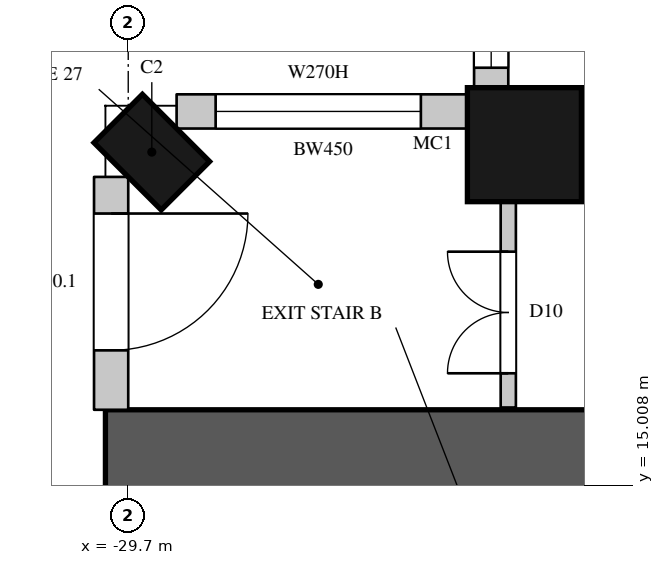
"""IFC4 building model, lengths in metres.
Left out: names, types, materials, properties, quantities, classifications, styles, units other than length and angle.
Written with IfcOpenShell. Run it as: python <this file> out.ifc"""

import sys

from ifc_helpers import new_model, si_unit, direction, frame, frame_2d, origin, origin_2d, place, context, subcontext, project, spatial, rectangle, circle, extrude, element, fill, save


model = new_model("IFC4")
c1 = context("Model", 3, precision=1e-05, world=origin(), true_north=direction((0.0, 1.0)))
c2 = subcontext(c1, "Body", "Model", "MODEL_VIEW")
j1 = project(units=[si_unit("LENGTHUNIT", "METRE"), si_unit("PLANEANGLEUNIT", "RADIAN")], contexts=[c1])
p1 = place(None, origin())
s1 = spatial("IfcSite", under=j1, at=p1, CompositionType="ELEMENT")
p2 = place(p1, origin())
s2 = spatial("IfcBuilding", under=s1, at=p2, CompositionType="ELEMENT")
p3 = place(p2, frame((0.0, 0.0, 127.5)))
s3 = spatial("IfcBuildingStorey", under=s2, at=p3, CompositionType="ELEMENT", Elevation=127.5)
p4 = place(p3, frame((-29.39, 19.39, 0.0), z_axis=(0.0, 0.0, 1.0), x_axis=(-0.707106781187, -0.707106781187, 0.0)))
e1 = element("IfcColumn", 1, at=p4, inside=s3, PredefinedType="COLUMN", context=c2, shape_type="SweptSolid", body=[
    extrude(rectangle(XDim=0.9, YDim=1.25, at=origin_2d()), origin(), (0.0, 0.0, 1.0), 3.6),
])
p5 = place(p3, frame((-24.488, 19.488, 0.0), z_axis=(0.0, 0.0, 1.0), x_axis=(1.0, 0.0, 0.0)))
e2 = element("IfcColumn", 2, at=p5, inside=s3, PredefinedType="COLUMN", context=c2, shape_type="SweptSolid", body=[
    extrude(circle(Radius=0.75, at=origin_2d()), origin(), (0.0, 0.0, 1.0), 3.6),
])
p6 = place(p3, frame((-29.925, 19.064, 0.0), z_axis=(0.0, 0.0, 1.0), x_axis=(0.0, -1.0, 0.0)))
e3 = element("IfcWall", 3, at=p6, inside=s3, PredefinedType="SOLIDWALL", context=c2, shape_type="SweptSolid", body=[
    extrude(rectangle(XDim=3.064, YDim=0.45, at=frame_2d((1.532, 0.0))), origin(), (0.0, 0.0, 1.0), 3.3),
])
p7 = place(p6, frame((0.482, 0.0, 0.0)))
e4 = element("IfcOpeningElement", 4, at=p7, cuts=e3, PredefinedType="OPENING", context=c2, shape_type="SweptSolid", body=[
    extrude(rectangle(XDim=1.8, YDim=2.4, at=frame_2d((0.9, 1.2))), frame((0.0, 0.235, 0.0), z_axis=(0.0, -1.0, 0.0), x_axis=(1.0, 0.0, 0.0)), (0.0, 0.0, 1.0), 0.47),
])
p8 = place(p3, frame((-24.925, 22.05, 0.0), z_axis=(0.0, 0.0, 1.0), x_axis=(0.0, -1.0, 0.0)))
e5 = element("IfcWall", 5, at=p8, inside=s3, PredefinedType="SOLIDWALL", context=c2, shape_type="SweptSolid", body=[
    extrude(rectangle(XDim=1.843, YDim=0.45, at=frame_2d((0.921, 0.0))), origin(), (0.0, 0.0, 1.0), 3.3),
])
p9 = place(p8, frame((0.35, 0.0, 1.05)))
e6 = element("IfcOpeningElement", 6, at=p9, cuts=e5, PredefinedType="OPENING", context=c2, shape_type="SweptSolid", body=[
    extrude(rectangle(XDim=1.2, YDim=2.0, at=frame_2d((0.6, 1.0))), frame((0.0, 0.235, 0.0), z_axis=(0.0, -1.0, 0.0), x_axis=(1.0, 0.0, 0.0)), (0.0, 0.0, 1.0), 0.47),
])
p10 = place(p3, frame((-25.207, 19.925, 0.0), z_axis=(0.0, 0.0, 1.0), x_axis=(-1.0, 0.0, 0.0)))
e7 = element("IfcWall", 7, at=p10, inside=s3, PredefinedType="SOLIDWALL", context=c2, shape_type="SweptSolid", body=[
    extrude(rectangle(XDim=3.857, YDim=0.45, at=frame_2d((1.928, 0.0))), origin(), (0.0, 0.0, 1.0), 3.3),
])
p11 = place(p10, frame((0.643, 0.0, 1.05)))
e8 = element("IfcOpeningElement", 8, at=p11, cuts=e7, PredefinedType="OPENING", context=c2, shape_type="SweptSolid", body=[
    extrude(rectangle(XDim=2.7, YDim=2.0, at=frame_2d((1.35, 1.0))), frame((0.0, 0.235, 0.0), z_axis=(0.0, -1.0, 0.0), x_axis=(1.0, 0.0, 0.0)), (0.0, 0.0, 1.0), 0.47),
])
p12 = place(p3, frame((-30.0, 15.4, 0.0), z_axis=(0.0, 0.0, 1.0), x_axis=(1.0, 0.0, 0.0)))
e9 = element("IfcWall", 9, at=p12, inside=s3, PredefinedType="SHEAR", context=c2, shape_type="SweptSolid", body=[
    extrude(rectangle(XDim=16.0, YDim=1.2, at=frame_2d((8.0, 0.0))), origin(), (0.0, 0.0, 1.0), 3.6),
])
p13 = place(p12, frame((13.4, 0.0, 0.0)))
e10 = element("IfcOpeningElement", 10, at=p13, cuts=e9, PredefinedType="OPENING", context=c2, shape_type="SweptSolid", body=[
    extrude(rectangle(XDim=1.5, YDim=2.4, at=frame_2d((0.75, 1.2))), frame((0.0, 0.61, 0.0), z_axis=(0.0, -1.0, 0.0), x_axis=(1.0, 0.0, 0.0)), (0.0, 0.0, 1.0), 1.22),
])
p14 = place(p3, frame((-24.7, 16.03, 0.0), z_axis=(0.0, 0.0, 1.0), x_axis=(0.0, 1.0, 0.0)))
e11 = element("IfcWall", 11, at=p14, inside=s3, PredefinedType="PARTITIONING", context=c2, shape_type="SweptSolid", body=[
    extrude(rectangle(XDim=2.722, YDim=0.2, at=frame_2d((1.361, 0.0))), origin(), (0.0, 0.0, 1.0), 3.3),
])
p15 = place(p14, frame((0.45, 0.0, 0.0)))
e12 = element("IfcOpeningElement", 12, at=p15, cuts=e11, PredefinedType="OPENING", context=c2, shape_type="SweptSolid", body=[
    extrude(rectangle(XDim=1.6, YDim=2.4, at=frame_2d((0.8, 1.2))), frame((0.0, 0.11, 0.0), z_axis=(0.0, -1.0, 0.0), x_axis=(1.0, 0.0, 0.0)), (0.0, 0.0, 1.0), 0.22),
])
p16 = place(p3, frame((-23.752, 19.7, 0.0), z_axis=(0.0, 0.0, 1.0), x_axis=(1.0, 0.0, 0.0)))
e13 = element("IfcWall", 13, at=p16, inside=s3, PredefinedType="PARTITIONING", context=c2, shape_type="SweptSolid", body=[
    extrude(rectangle(XDim=3.152, YDim=0.2, at=frame_2d((1.576, 0.0))), origin(), (0.0, 0.0, 1.0), 3.3),
])
p17 = place(p16, frame((1.9, 0.0, 0.0)))
e14 = element("IfcOpeningElement", 14, at=p17, cuts=e13, PredefinedType="OPENING", context=c2, shape_type="SweptSolid", body=[
    extrude(rectangle(XDim=0.95, YDim=2.2, at=frame_2d((0.475, 1.1))), frame((0.0, 0.11, 0.0), z_axis=(0.0, -1.0, 0.0), x_axis=(1.0, 0.0, 0.0)), (0.0, 0.0, 1.0), 0.22),
])
p18 = place(p7, origin())
e15 = element("IfcDoor", 15, at=p18, inside=s3, OperationType="SLIDING_TO_LEFT", PredefinedType="DOOR", context=c2, shape_type="SweptSolid", body=[
    extrude(rectangle(XDim=1.8, YDim=2.4, at=frame_2d((0.9, 1.2))), frame((0.0, 0.13, 0.0), z_axis=(0.0, -1.0, 0.0), x_axis=(1.0, 0.0, 0.0)), (0.0, 0.0, 1.0), 0.05),
])
fill(e4, e15)
p19 = place(p9, origin())
e16 = element("IfcWindow", 16, at=p19, inside=s3, PartitioningType="SINGLE_PANEL", PredefinedType="WINDOW", context=c2, shape_type="SweptSolid", body=[
    extrude(rectangle(XDim=1.2, YDim=2.0, at=frame_2d((0.6, 1.0))), frame((0.0, 0.135, 0.0), z_axis=(0.0, -1.0, 0.0), x_axis=(1.0, 0.0, 0.0)), (0.0, 0.0, 1.0), 0.06),
])
fill(e6, e16)
p20 = place(p11, origin())
e17 = element("IfcWindow", 17, at=p20, inside=s3, PartitioningType="SINGLE_PANEL", PredefinedType="WINDOW", context=c2, shape_type="SweptSolid", body=[
    extrude(rectangle(XDim=2.7, YDim=2.0, at=frame_2d((1.35, 1.0))), frame((0.0, 0.135, 0.0), z_axis=(0.0, -1.0, 0.0), x_axis=(1.0, 0.0, 0.0)), (0.0, 0.0, 1.0), 0.06),
])
fill(e8, e17)
p21 = place(p15, origin())
e18 = element("IfcDoor", 18, at=p21, inside=s3, OperationType="DOUBLE_DOOR_SINGLE_SWING", PredefinedType="DOOR", context=c2, shape_type="SweptSolid", body=[
    extrude(rectangle(XDim=1.6, YDim=2.4, at=frame_2d((0.8, 1.2))), frame((0.0, 0.025, 0.0), z_axis=(0.0, -1.0, 0.0), x_axis=(1.0, 0.0, 0.0)), (0.0, 0.0, 1.0), 0.05),
])
fill(e12, e18)
save(model, sys.argv[1])
